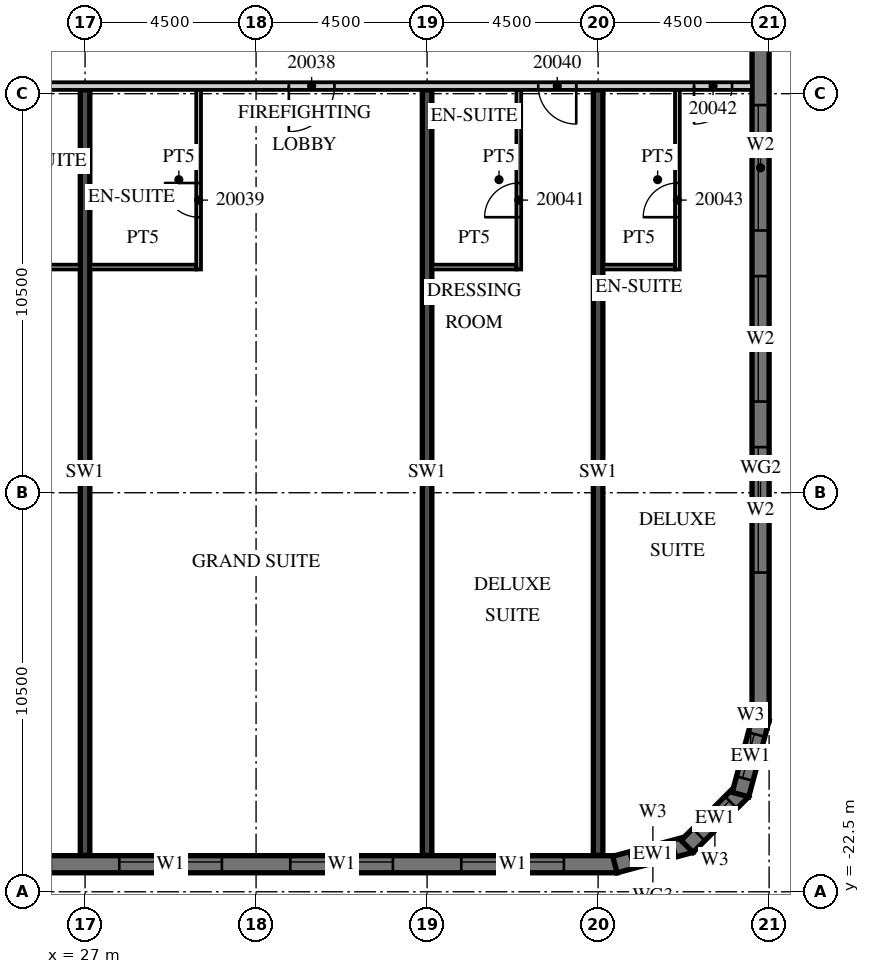
"""IFC4 building model, lengths in metres.
Left out: names, types, materials, properties, quantities, classifications, styles, units other than length and angle.
Written with IfcOpenShell. Run it as: python <this file> out.ifc"""

import sys

from ifc_helpers import new_model, si_unit, direction, frame, frame_2d, origin, place, context, subcontext, project, spatial, polyline, rectangle, outline, extrude, element, fill, save


model = new_model("IFC4")
c1 = context("Model", 3, precision=1e-05, world=origin(), true_north=direction((0.0, 1.0)))
c2 = subcontext(c1, "Body", "Model", "MODEL_VIEW")
j1 = project(units=[si_unit("LENGTHUNIT", "METRE"), si_unit("PLANEANGLEUNIT", "RADIAN")], contexts=[c1])
p1 = place(None, origin())
s1 = spatial("IfcSite", under=j1, at=p1, CompositionType="ELEMENT")
p2 = place(p1, origin())
s2 = spatial("IfcBuilding", under=s1, at=p2, CompositionType="ELEMENT")
p3 = place(p2, frame((0.0, 0.0, 96.3)))
s3 = spatial("IfcBuildingStorey", under=s2, at=p3, CompositionType="ELEMENT", Elevation=96.3)
for number, where, z_axis, x_axis in (
    (1, (27.0, -21.54, 0.0), (0.0, 0.0, 1.0), (0.0, 1.0, 0.0)),
    (2, (36.0, -21.54, 0.0), (0.0, 0.0, 1.0), (0.0, 1.0, 0.0)),
    (3, (40.5, -21.54, 0.0), (0.0, 0.0, 1.0), (0.0, 1.0, 0.0)),
):
    element("IfcWall", number, at=place(p3, frame(where, z_axis=z_axis, x_axis=x_axis)), inside=s3, PredefinedType="SHEAR", context=c2, shape_type="SweptSolid", body=[
        extrude(rectangle(XDim=20.14, YDim=0.25, at=frame_2d((10.07, 0.0))), origin(), (0.0, 0.0, 1.0), 3.0),
    ])
p4 = place(p3, frame((-13.5, -21.775, 0.0), z_axis=(0.0, 0.0, 1.0), x_axis=(1.0, 0.0, 0.0)))
e4 = element("IfcWall", 4, at=p4, inside=s3, PredefinedType="SOLIDWALL", context=c2, shape_type="SweptSolid", body=[
    extrude(rectangle(XDim=54.5, YDim=0.45, at=frame_2d((27.25, 0.0))), origin(), (0.0, 0.0, 1.0), 3.0),
])
p5 = place(p4, frame((0.9, 0.0, 0.45)))
e5 = element("IfcOpeningElement", 5, at=p5, cuts=e4, PredefinedType="OPENING", context=c2, shape_type="SweptSolid", body=[
    extrude(rectangle(XDim=2.7, YDim=2.25, at=frame_2d((1.35, 1.125))), frame((0.0, 0.235, 0.0), z_axis=(0.0, -1.0, 0.0), x_axis=(1.0, 0.0, 0.0)), (0.0, 0.0, 1.0), 0.47),
])
p6 = place(p4, frame((5.4, 0.0, 0.45)))
e6 = element("IfcOpeningElement", 6, at=p6, cuts=e4, PredefinedType="OPENING", context=c2, shape_type="SweptSolid", body=[
    extrude(rectangle(XDim=2.7, YDim=2.25, at=frame_2d((1.35, 1.125))), frame((0.0, 0.235, 0.0), z_axis=(0.0, -1.0, 0.0), x_axis=(1.0, 0.0, 0.0)), (0.0, 0.0, 1.0), 0.47),
])
p7 = place(p4, frame((9.9, 0.0, 0.45)))
e7 = element("IfcOpeningElement", 7, at=p7, cuts=e4, PredefinedType="OPENING", context=c2, shape_type="SweptSolid", body=[
    extrude(rectangle(XDim=2.7, YDim=2.25, at=frame_2d((1.35, 1.125))), frame((0.0, 0.235, 0.0), z_axis=(0.0, -1.0, 0.0), x_axis=(1.0, 0.0, 0.0)), (0.0, 0.0, 1.0), 0.47),
])
p8 = place(p4, frame((14.4, 0.0, 0.45)))
e8 = element("IfcOpeningElement", 8, at=p8, cuts=e4, PredefinedType="OPENING", context=c2, shape_type="SweptSolid", body=[
    extrude(rectangle(XDim=2.7, YDim=2.25, at=frame_2d((1.35, 1.125))), frame((0.0, 0.235, 0.0), z_axis=(0.0, -1.0, 0.0), x_axis=(1.0, 0.0, 0.0)), (0.0, 0.0, 1.0), 0.47),
])
p9 = place(p4, frame((18.9, 0.0, 0.45)))
e9 = element("IfcOpeningElement", 9, at=p9, cuts=e4, PredefinedType="OPENING", context=c2, shape_type="SweptSolid", body=[
    extrude(rectangle(XDim=2.7, YDim=2.25, at=frame_2d((1.35, 1.125))), frame((0.0, 0.235, 0.0), z_axis=(0.0, -1.0, 0.0), x_axis=(1.0, 0.0, 0.0)), (0.0, 0.0, 1.0), 0.47),
])
p10 = place(p4, frame((23.4, 0.0, 0.45)))
e10 = element("IfcOpeningElement", 10, at=p10, cuts=e4, PredefinedType="OPENING", context=c2, shape_type="SweptSolid", body=[
    extrude(rectangle(XDim=2.7, YDim=2.25, at=frame_2d((1.35, 1.125))), frame((0.0, 0.235, 0.0), z_axis=(0.0, -1.0, 0.0), x_axis=(1.0, 0.0, 0.0)), (0.0, 0.0, 1.0), 0.47),
])
p11 = place(p4, frame((27.9, 0.0, 0.45)))
e11 = element("IfcOpeningElement", 11, at=p11, cuts=e4, PredefinedType="OPENING", context=c2, shape_type="SweptSolid", body=[
    extrude(rectangle(XDim=2.7, YDim=2.25, at=frame_2d((1.35, 1.125))), frame((0.0, 0.235, 0.0), z_axis=(0.0, -1.0, 0.0), x_axis=(1.0, 0.0, 0.0)), (0.0, 0.0, 1.0), 0.47),
])
p12 = place(p4, frame((32.4, 0.0, 0.45)))
e12 = element("IfcOpeningElement", 12, at=p12, cuts=e4, PredefinedType="OPENING", context=c2, shape_type="SweptSolid", body=[
    extrude(rectangle(XDim=2.7, YDim=2.25, at=frame_2d((1.35, 1.125))), frame((0.0, 0.235, 0.0), z_axis=(0.0, -1.0, 0.0), x_axis=(1.0, 0.0, 0.0)), (0.0, 0.0, 1.0), 0.47),
])
p13 = place(p4, frame((36.9, 0.0, 0.45)))
e13 = element("IfcOpeningElement", 13, at=p13, cuts=e4, PredefinedType="OPENING", context=c2, shape_type="SweptSolid", body=[
    extrude(rectangle(XDim=2.7, YDim=2.25, at=frame_2d((1.35, 1.125))), frame((0.0, 0.235, 0.0), z_axis=(0.0, -1.0, 0.0), x_axis=(1.0, 0.0, 0.0)), (0.0, 0.0, 1.0), 0.47),
])
p14 = place(p4, frame((41.4, 0.0, 0.45)))
e14 = element("IfcOpeningElement", 14, at=p14, cuts=e4, PredefinedType="OPENING", context=c2, shape_type="SweptSolid", body=[
    extrude(rectangle(XDim=2.7, YDim=2.25, at=frame_2d((1.35, 1.125))), frame((0.0, 0.235, 0.0), z_axis=(0.0, -1.0, 0.0), x_axis=(1.0, 0.0, 0.0)), (0.0, 0.0, 1.0), 0.47),
])
p15 = place(p4, frame((45.9, 0.0, 0.45)))
e15 = element("IfcOpeningElement", 15, at=p15, cuts=e4, PredefinedType="OPENING", context=c2, shape_type="SweptSolid", body=[
    extrude(rectangle(XDim=2.7, YDim=2.25, at=frame_2d((1.35, 1.125))), frame((0.0, 0.235, 0.0), z_axis=(0.0, -1.0, 0.0), x_axis=(1.0, 0.0, 0.0)), (0.0, 0.0, 1.0), 0.47),
])
p16 = place(p4, frame((50.4, 0.0, 0.45)))
e16 = element("IfcOpeningElement", 16, at=p16, cuts=e4, PredefinedType="OPENING", context=c2, shape_type="SweptSolid", body=[
    extrude(rectangle(XDim=2.7, YDim=2.25, at=frame_2d((1.35, 1.125))), frame((0.0, 0.235, 0.0), z_axis=(0.0, -1.0, 0.0), x_axis=(1.0, 0.0, 0.0)), (0.0, 0.0, 1.0), 0.47),
])
p17 = place(p3, frame((40.942, -21.783, 0.0), z_axis=(0.0, 0.0, 1.0), x_axis=(0.965926999034, 0.25881466832, 0.0)))
e17 = element("IfcWall", 17, at=p17, inside=s3, PredefinedType="SOLIDWALL", context=c2, shape_type="SweptSolid", body=[
    extrude(outline(polyline([(0.0, -0.225), (2.071, -0.225), (1.95, 0.225), (0.121, 0.225), (0.0, -0.225)])), origin(), (0.0, 0.0, 1.0), 3.0),
])
p18 = place(p17, frame((0.435, 0.0, 0.45)))
e18 = element("IfcOpeningElement", 18, at=p18, cuts=e17, PredefinedType="OPENING", context=c2, shape_type="SweptSolid", body=[
    extrude(rectangle(XDim=1.2, YDim=2.25, at=frame_2d((0.6, 1.125))), frame((0.0, 0.235, 0.0), z_axis=(0.0, -1.0, 0.0), x_axis=(1.0, 0.0, 0.0)), (0.0, 0.0, 1.0), 0.47),
])
p19 = place(p3, frame((42.841, -21.305, 0.0), z_axis=(0.0, 0.0, 1.0), x_axis=(0.707106781187, 0.707106781187, 0.0)))
e19 = element("IfcWall", 19, at=p19, inside=s3, PredefinedType="SOLIDWALL", context=c2, shape_type="SweptSolid", body=[
    extrude(outline(polyline([(0.0, -0.225), (2.071, -0.225), (1.95, 0.225), (0.121, 0.225), (0.0, -0.225)])), origin(), (0.0, 0.0, 1.0), 3.0),
])
p20 = place(p19, frame((0.435, 0.0, 0.45)))
e20 = element("IfcOpeningElement", 20, at=p20, cuts=e19, PredefinedType="OPENING", context=c2, shape_type="SweptSolid", body=[
    extrude(rectangle(XDim=1.2, YDim=2.25, at=frame_2d((0.6, 1.125))), frame((0.0, 0.235, 0.0), z_axis=(0.0, -1.0, 0.0), x_axis=(1.0, 0.0, 0.0)), (0.0, 0.0, 1.0), 0.47),
])
p21 = place(p3, frame((44.247, -19.942, 0.0), z_axis=(0.0, 0.0, 1.0), x_axis=(0.25881466832, 0.965926999034, 0.0)))
e21 = element("IfcWall", 21, at=p21, inside=s3, PredefinedType="SOLIDWALL", context=c2, shape_type="SweptSolid", body=[
    extrude(outline(polyline([(-0.0, -0.225), (2.07, -0.225), (1.95, 0.225), (0.12, 0.225), (-0.0, -0.225)])), origin(), (0.0, 0.0, 1.0), 3.0),
])
p22 = place(p21, frame((0.435, 0.0, 0.45)))
e22 = element("IfcOpeningElement", 22, at=p22, cuts=e21, PredefinedType="OPENING", context=c2, shape_type="SweptSolid", body=[
    extrude(rectangle(XDim=1.2, YDim=2.25, at=frame_2d((0.6, 1.125))), frame((0.0, 0.235, 0.0), z_axis=(0.0, -1.0, 0.0), x_axis=(1.0, 0.0, 0.0)), (0.0, 0.0, 1.0), 0.47),
])
p23 = place(p3, frame((44.775, -18.0, 0.0), z_axis=(0.0, 0.0, 1.0), x_axis=(0.0, 1.0, 0.0)))
e23 = element("IfcWall", 23, at=p23, inside=s3, PredefinedType="SOLIDWALL", context=c2, shape_type="SweptSolid", body=[
    extrude(rectangle(XDim=36.0, YDim=0.45, at=frame_2d((18.0, 0.0))), origin(), (0.0, 0.0, 1.0), 3.0),
])
p24 = place(p23, frame((3.9, 0.0, 0.45)))
e24 = element("IfcOpeningElement", 24, at=p24, cuts=e23, PredefinedType="OPENING", context=c2, shape_type="SweptSolid", body=[
    extrude(rectangle(XDim=3.3, YDim=2.25, at=frame_2d((1.65, 1.125))), frame((0.0, 0.235, 0.0), z_axis=(0.0, -1.0, 0.0), x_axis=(1.0, 0.0, 0.0)), (0.0, 0.0, 1.0), 0.47),
])
p25 = place(p23, frame((8.4, 0.0, 0.45)))
e25 = element("IfcOpeningElement", 25, at=p25, cuts=e23, PredefinedType="OPENING", context=c2, shape_type="SweptSolid", body=[
    extrude(rectangle(XDim=3.3, YDim=2.25, at=frame_2d((1.65, 1.125))), frame((0.0, 0.235, 0.0), z_axis=(0.0, -1.0, 0.0), x_axis=(1.0, 0.0, 0.0)), (0.0, 0.0, 1.0), 0.47),
])
p26 = place(p23, frame((12.9, 0.0, 0.45)))
e26 = element("IfcOpeningElement", 26, at=p26, cuts=e23, PredefinedType="OPENING", context=c2, shape_type="SweptSolid", body=[
    extrude(rectangle(XDim=3.3, YDim=2.25, at=frame_2d((1.65, 1.125))), frame((0.0, 0.235, 0.0), z_axis=(0.0, -1.0, 0.0), x_axis=(1.0, 0.0, 0.0)), (0.0, 0.0, 1.0), 0.47),
])
p27 = place(p3, frame((-13.5, -1.3, 0.0), z_axis=(0.0, 0.0, 1.0), x_axis=(1.0, 0.0, 0.0)))
e27 = element("IfcWall", 27, at=p27, inside=s3, PredefinedType="PARTITIONING", context=c2, shape_type="SweptSolid", body=[
    extrude(rectangle(XDim=58.05, YDim=0.2, at=frame_2d((29.025, 0.0))), origin(), (0.0, 0.0, 1.0), 3.0),
])
p28 = place(p27, frame((0.575, 0.0, 0.0)))
e28 = element("IfcOpeningElement", 28, at=p28, cuts=e27, PredefinedType="OPENING", context=c2, shape_type="SweptSolid", body=[
    extrude(rectangle(XDim=1.0, YDim=2.1, at=frame_2d((0.5, 1.05))), frame((0.0, 0.11, 0.0), z_axis=(0.0, -1.0, 0.0), x_axis=(1.0, 0.0, 0.0)), (0.0, 0.0, 1.0), 0.22),
])
p29 = place(p27, frame((7.45, 0.0, 0.0)))
e29 = element("IfcOpeningElement", 29, at=p29, cuts=e27, PredefinedType="OPENING", context=c2, shape_type="SweptSolid", body=[
    extrude(rectangle(XDim=1.0, YDim=2.1, at=frame_2d((0.5, 1.05))), frame((0.0, 0.11, 0.0), z_axis=(0.0, -1.0, 0.0), x_axis=(1.0, 0.0, 0.0)), (0.0, 0.0, 1.0), 0.22),
])
p30 = place(p27, frame((11.925, 0.0, 0.0)))
e30 = element("IfcOpeningElement", 30, at=p30, cuts=e27, PredefinedType="OPENING", context=c2, shape_type="SweptSolid", body=[
    extrude(rectangle(XDim=1.0, YDim=2.1, at=frame_2d((0.5, 1.05))), frame((0.0, 0.11, 0.0), z_axis=(0.0, -1.0, 0.0), x_axis=(1.0, 0.0, 0.0)), (0.0, 0.0, 1.0), 0.22),
])
p31 = place(p27, frame((14.075, 0.0, 0.0)))
e31 = element("IfcOpeningElement", 31, at=p31, cuts=e27, PredefinedType="OPENING", context=c2, shape_type="SweptSolid", body=[
    extrude(rectangle(XDim=1.0, YDim=2.1, at=frame_2d((0.5, 1.05))), frame((0.0, 0.11, 0.0), z_axis=(0.0, -1.0, 0.0), x_axis=(1.0, 0.0, 0.0)), (0.0, 0.0, 1.0), 0.22),
])
p32 = place(p27, frame((20.925, 0.0, 0.0)))
e32 = element("IfcOpeningElement", 32, at=p32, cuts=e27, PredefinedType="OPENING", context=c2, shape_type="SweptSolid", body=[
    extrude(rectangle(XDim=1.0, YDim=2.1, at=frame_2d((0.5, 1.05))), frame((0.0, 0.11, 0.0), z_axis=(0.0, -1.0, 0.0), x_axis=(1.0, 0.0, 0.0)), (0.0, 0.0, 1.0), 0.22),
])
p33 = place(p27, frame((27.862, 0.0, 0.0)))
e33 = element("IfcOpeningElement", 33, at=p33, cuts=e27, PredefinedType="OPENING", context=c2, shape_type="SweptSolid", body=[
    extrude(rectangle(XDim=1.2, YDim=2.1, at=frame_2d((0.6, 1.05))), frame((0.0, 0.11, 0.0), z_axis=(0.0, -1.0, 0.0), x_axis=(1.0, 0.0, 0.0)), (0.0, 0.0, 1.0), 0.22),
])
p34 = place(p27, frame((33.938, 0.0, 0.0)))
e34 = element("IfcOpeningElement", 34, at=p34, cuts=e27, PredefinedType="OPENING", context=c2, shape_type="SweptSolid", body=[
    extrude(rectangle(XDim=1.2, YDim=2.1, at=frame_2d((0.6, 1.05))), frame((0.0, 0.11, 0.0), z_axis=(0.0, -1.0, 0.0), x_axis=(1.0, 0.0, 0.0)), (0.0, 0.0, 1.0), 0.22),
])
p35 = place(p27, frame((45.862, 0.0, 0.0)))
e35 = element("IfcOpeningElement", 35, at=p35, cuts=e27, PredefinedType="OPENING", context=c2, shape_type="SweptSolid", body=[
    extrude(rectangle(XDim=1.2, YDim=2.1, at=frame_2d((0.6, 1.05))), frame((0.0, 0.11, 0.0), z_axis=(0.0, -1.0, 0.0), x_axis=(1.0, 0.0, 0.0)), (0.0, 0.0, 1.0), 0.22),
])
p36 = place(p27, frame((52.425, 0.0, 0.0)))
e36 = element("IfcOpeningElement", 36, at=p36, cuts=e27, PredefinedType="OPENING", context=c2, shape_type="SweptSolid", body=[
    extrude(rectangle(XDim=1.0, YDim=2.1, at=frame_2d((0.5, 1.05))), frame((0.0, 0.11, 0.0), z_axis=(0.0, -1.0, 0.0), x_axis=(1.0, 0.0, 0.0)), (0.0, 0.0, 1.0), 0.22),
])
p37 = place(p27, frame((56.525, 0.0, 0.0)))
e37 = element("IfcOpeningElement", 37, at=p37, cuts=e27, PredefinedType="OPENING", context=c2, shape_type="SweptSolid", body=[
    extrude(rectangle(XDim=1.0, YDim=2.1, at=frame_2d((0.5, 1.05))), frame((0.0, 0.11, 0.0), z_axis=(0.0, -1.0, 0.0), x_axis=(1.0, 0.0, 0.0)), (0.0, 0.0, 1.0), 0.22),
])
p38 = place(p3, frame((24.075, -6.062, 0.0), z_axis=(0.0, 0.0, 1.0), x_axis=(1.0, 0.0, 0.0)))
e38 = element("IfcWall", 38, at=p38, inside=s3, PredefinedType="PARTITIONING", context=c2, shape_type="SweptSolid", body=[
    extrude(rectangle(XDim=2.8, YDim=0.125, at=frame_2d((1.4, 0.0))), origin(), (0.0, 0.0, 1.0), 3.0),
])
p39 = place(p3, frame((29.988, -6.125, 0.0), z_axis=(0.0, 0.0, 1.0), x_axis=(0.0, 1.0, 0.0)))
e39 = element("IfcWall", 39, at=p39, inside=s3, PredefinedType="PARTITIONING", context=c2, shape_type="SweptSolid", body=[
    extrude(rectangle(XDim=4.725, YDim=0.125, at=frame_2d((2.363, 0.0))), origin(), (0.0, 0.0, 1.0), 3.0),
])
p40 = place(p39, frame((1.375, 0.0, 0.0)))
e40 = element("IfcOpeningElement", 40, at=p40, cuts=e39, PredefinedType="OPENING", context=c2, shape_type="SweptSolid", body=[
    extrude(rectangle(XDim=0.9, YDim=2.1, at=frame_2d((0.45, 1.05))), frame((0.0, 0.073, 0.0), z_axis=(0.0, -1.0, 0.0), x_axis=(1.0, 0.0, 0.0)), (0.0, 0.0, 1.0), 0.145),
])
p41 = place(p3, frame((27.125, -6.062, 0.0), z_axis=(0.0, 0.0, 1.0), x_axis=(1.0, 0.0, 0.0)))
e41 = element("IfcWall", 41, at=p41, inside=s3, PredefinedType="PARTITIONING", context=c2, shape_type="SweptSolid", body=[
    extrude(rectangle(XDim=2.8, YDim=0.125, at=frame_2d((1.4, 0.0))), origin(), (0.0, 0.0, 1.0), 3.0),
])
p42 = place(p3, frame((38.413, -6.125, 0.0), z_axis=(0.0, 0.0, 1.0), x_axis=(0.0, 1.0, 0.0)))
e42 = element("IfcWall", 42, at=p42, inside=s3, PredefinedType="PARTITIONING", context=c2, shape_type="SweptSolid", body=[
    extrude(rectangle(XDim=4.725, YDim=0.125, at=frame_2d((2.363, 0.0))), origin(), (0.0, 0.0, 1.0), 3.0),
])
p43 = place(p42, frame((1.375, 0.0, 0.0)))
e43 = element("IfcOpeningElement", 43, at=p43, cuts=e42, PredefinedType="OPENING", context=c2, shape_type="SweptSolid", body=[
    extrude(rectangle(XDim=0.9, YDim=2.1, at=frame_2d((0.45, 1.05))), frame((0.0, 0.073, 0.0), z_axis=(0.0, -1.0, 0.0), x_axis=(1.0, 0.0, 0.0)), (0.0, 0.0, 1.0), 0.145),
])
p44 = place(p3, frame((36.125, -6.062, 0.0), z_axis=(0.0, 0.0, 1.0), x_axis=(1.0, 0.0, 0.0)))
e44 = element("IfcWall", 44, at=p44, inside=s3, PredefinedType="PARTITIONING", context=c2, shape_type="SweptSolid", body=[
    extrude(rectangle(XDim=2.225, YDim=0.125, at=frame_2d((1.113, 0.0))), origin(), (0.0, 0.0, 1.0), 3.0),
])
p45 = place(p3, frame((42.587, -6.125, 0.0), z_axis=(0.0, 0.0, 1.0), x_axis=(0.0, 1.0, 0.0)))
e45 = element("IfcWall", 45, at=p45, inside=s3, PredefinedType="PARTITIONING", context=c2, shape_type="SweptSolid", body=[
    extrude(rectangle(XDim=4.725, YDim=0.125, at=frame_2d((2.363, 0.0))), origin(), (0.0, 0.0, 1.0), 3.0),
])
p46 = place(p45, frame((1.375, 0.0, 0.0)))
e46 = element("IfcOpeningElement", 46, at=p46, cuts=e45, PredefinedType="OPENING", context=c2, shape_type="SweptSolid", body=[
    extrude(rectangle(XDim=0.9, YDim=2.1, at=frame_2d((0.45, 1.05))), frame((0.0, 0.073, 0.0), z_axis=(0.0, -1.0, 0.0), x_axis=(1.0, 0.0, 0.0)), (0.0, 0.0, 1.0), 0.145),
])
p47 = place(p3, frame((40.625, -6.062, 0.0), z_axis=(0.0, 0.0, 1.0), x_axis=(1.0, 0.0, 0.0)))
e47 = element("IfcWall", 47, at=p47, inside=s3, PredefinedType="PARTITIONING", context=c2, shape_type="SweptSolid", body=[
    extrude(rectangle(XDim=1.9, YDim=0.125, at=frame_2d((0.95, 0.0))), origin(), (0.0, 0.0, 1.0), 3.0),
])
p48 = place(p14, origin())
e48 = element("IfcWindow", 48, at=p48, inside=s3, PartitioningType="SINGLE_PANEL", PredefinedType="WINDOW", context=c2, shape_type="SweptSolid", body=[
    extrude(rectangle(XDim=2.7, YDim=2.25, at=frame_2d((1.35, 1.125))), frame((0.0, 0.09, 0.0), z_axis=(0.0, -1.0, 0.0), x_axis=(1.0, 0.0, 0.0)), (0.0, 0.0, 1.0), 0.06),
])
fill(e14, e48)
p49 = place(p15, origin())
e49 = element("IfcWindow", 49, at=p49, inside=s3, PartitioningType="SINGLE_PANEL", PredefinedType="WINDOW", context=c2, shape_type="SweptSolid", body=[
    extrude(rectangle(XDim=2.7, YDim=2.25, at=frame_2d((1.35, 1.125))), frame((0.0, 0.09, 0.0), z_axis=(0.0, -1.0, 0.0), x_axis=(1.0, 0.0, 0.0)), (0.0, 0.0, 1.0), 0.06),
])
fill(e15, e49)
p50 = place(p16, origin())
e50 = element("IfcWindow", 50, at=p50, inside=s3, PartitioningType="SINGLE_PANEL", PredefinedType="WINDOW", context=c2, shape_type="SweptSolid", body=[
    extrude(rectangle(XDim=2.7, YDim=2.25, at=frame_2d((1.35, 1.125))), frame((0.0, 0.09, 0.0), z_axis=(0.0, -1.0, 0.0), x_axis=(1.0, 0.0, 0.0)), (0.0, 0.0, 1.0), 0.06),
])
fill(e16, e50)
p51 = place(p18, origin())
e51 = element("IfcWindow", 51, at=p51, inside=s3, PartitioningType="SINGLE_PANEL", PredefinedType="WINDOW", context=c2, shape_type="SweptSolid", body=[
    extrude(rectangle(XDim=1.2, YDim=2.25, at=frame_2d((0.6, 1.125))), frame((0.0, 0.09, 0.0), z_axis=(0.0, -1.0, 0.0), x_axis=(1.0, 0.0, 0.0)), (0.0, 0.0, 1.0), 0.06),
])
fill(e18, e51)
p52 = place(p20, origin())
e52 = element("IfcWindow", 52, at=p52, inside=s3, PartitioningType="SINGLE_PANEL", PredefinedType="WINDOW", context=c2, shape_type="SweptSolid", body=[
    extrude(rectangle(XDim=1.2, YDim=2.25, at=frame_2d((0.6, 1.125))), frame((0.0, 0.09, 0.0), z_axis=(0.0, -1.0, 0.0), x_axis=(1.0, 0.0, 0.0)), (0.0, 0.0, 1.0), 0.06),
])
fill(e20, e52)
p53 = place(p22, origin())
e53 = element("IfcWindow", 53, at=p53, inside=s3, PartitioningType="SINGLE_PANEL", PredefinedType="WINDOW", context=c2, shape_type="SweptSolid", body=[
    extrude(rectangle(XDim=1.2, YDim=2.25, at=frame_2d((0.6, 1.125))), frame((0.0, 0.09, 0.0), z_axis=(0.0, -1.0, 0.0), x_axis=(1.0, 0.0, 0.0)), (0.0, 0.0, 1.0), 0.06),
])
fill(e22, e53)
p54 = place(p24, origin())
e54 = element("IfcWindow", 54, at=p54, inside=s3, PartitioningType="SINGLE_PANEL", PredefinedType="WINDOW", context=c2, shape_type="SweptSolid", body=[
    extrude(rectangle(XDim=3.3, YDim=2.25, at=frame_2d((1.65, 1.125))), frame((0.0, 0.09, 0.0), z_axis=(0.0, -1.0, 0.0), x_axis=(1.0, 0.0, 0.0)), (0.0, 0.0, 1.0), 0.06),
])
fill(e24, e54)
p55 = place(p25, origin())
e55 = element("IfcWindow", 55, at=p55, inside=s3, PartitioningType="SINGLE_PANEL", PredefinedType="WINDOW", context=c2, shape_type="SweptSolid", body=[
    extrude(rectangle(XDim=3.3, YDim=2.25, at=frame_2d((1.65, 1.125))), frame((0.0, 0.09, 0.0), z_axis=(0.0, -1.0, 0.0), x_axis=(1.0, 0.0, 0.0)), (0.0, 0.0, 1.0), 0.06),
])
fill(e25, e55)
p56 = place(p26, origin())
e56 = element("IfcWindow", 56, at=p56, inside=s3, PartitioningType="SINGLE_PANEL", PredefinedType="WINDOW", context=c2, shape_type="SweptSolid", body=[
    extrude(rectangle(XDim=3.3, YDim=2.25, at=frame_2d((1.65, 1.125))), frame((0.0, 0.09, 0.0), z_axis=(0.0, -1.0, 0.0), x_axis=(1.0, 0.0, 0.0)), (0.0, 0.0, 1.0), 0.06),
])
fill(e26, e56)
p57 = place(p35, origin())
e57 = element("IfcDoor", 57, at=p57, inside=s3, OperationType="SINGLE_SWING_LEFT", PredefinedType="DOOR", context=c2, shape_type="SweptSolid", body=[
    extrude(rectangle(XDim=1.2, YDim=2.1, at=frame_2d((0.6, 1.05))), frame((0.0, 0.025, 0.0), z_axis=(0.0, -1.0, 0.0), x_axis=(1.0, 0.0, 0.0)), (0.0, 0.0, 1.0), 0.05),
])
fill(e35, e57)
p58 = place(p40, origin())
e58 = element("IfcDoor", 58, at=p58, inside=s3, OperationType="SINGLE_SWING_RIGHT", PredefinedType="DOOR", context=c2, shape_type="SweptSolid", body=[
    extrude(rectangle(XDim=0.9, YDim=2.1, at=frame_2d((0.45, 1.05))), frame((0.0, 0.025, 0.0), z_axis=(0.0, -1.0, 0.0), x_axis=(1.0, 0.0, 0.0)), (0.0, 0.0, 1.0), 0.05),
])
fill(e40, e58)
p59 = place(p36, origin())
e59 = element("IfcDoor", 59, at=p59, inside=s3, OperationType="SINGLE_SWING_RIGHT", PredefinedType="DOOR", context=c2, shape_type="SweptSolid", body=[
    extrude(rectangle(XDim=1.0, YDim=2.1, at=frame_2d((0.5, 1.05))), frame((0.0, 0.025, 0.0), z_axis=(0.0, -1.0, 0.0), x_axis=(1.0, 0.0, 0.0)), (0.0, 0.0, 1.0), 0.05),
])
fill(e36, e59)
p60 = place(p43, origin())
e60 = element("IfcDoor", 60, at=p60, inside=s3, OperationType="SINGLE_SWING_LEFT", PredefinedType="DOOR", context=c2, shape_type="SweptSolid", body=[
    extrude(rectangle(XDim=0.9, YDim=2.1, at=frame_2d((0.45, 1.05))), frame((0.0, 0.025, 0.0), z_axis=(0.0, -1.0, 0.0), x_axis=(1.0, 0.0, 0.0)), (0.0, 0.0, 1.0), 0.05),
])
fill(e43, e60)
p61 = place(p37, origin())
e61 = element("IfcDoor", 61, at=p61, inside=s3, OperationType="SINGLE_SWING_LEFT", PredefinedType="DOOR", context=c2, shape_type="SweptSolid", body=[
    extrude(rectangle(XDim=1.0, YDim=2.1, at=frame_2d((0.5, 1.05))), frame((0.0, 0.025, 0.0), z_axis=(0.0, -1.0, 0.0), x_axis=(1.0, 0.0, 0.0)), (0.0, 0.0, 1.0), 0.05),
])
fill(e37, e61)
p62 = place(p46, origin())
e62 = element("IfcDoor", 62, at=p62, inside=s3, OperationType="SINGLE_SWING_LEFT", PredefinedType="DOOR", context=c2, shape_type="SweptSolid", body=[
    extrude(rectangle(XDim=0.9, YDim=2.1, at=frame_2d((0.45, 1.05))), frame((0.0, 0.025, 0.0), z_axis=(0.0, -1.0, 0.0), x_axis=(1.0, 0.0, 0.0)), (0.0, 0.0, 1.0), 0.05),
])
fill(e46, e62)
save(model, sys.argv[1])
